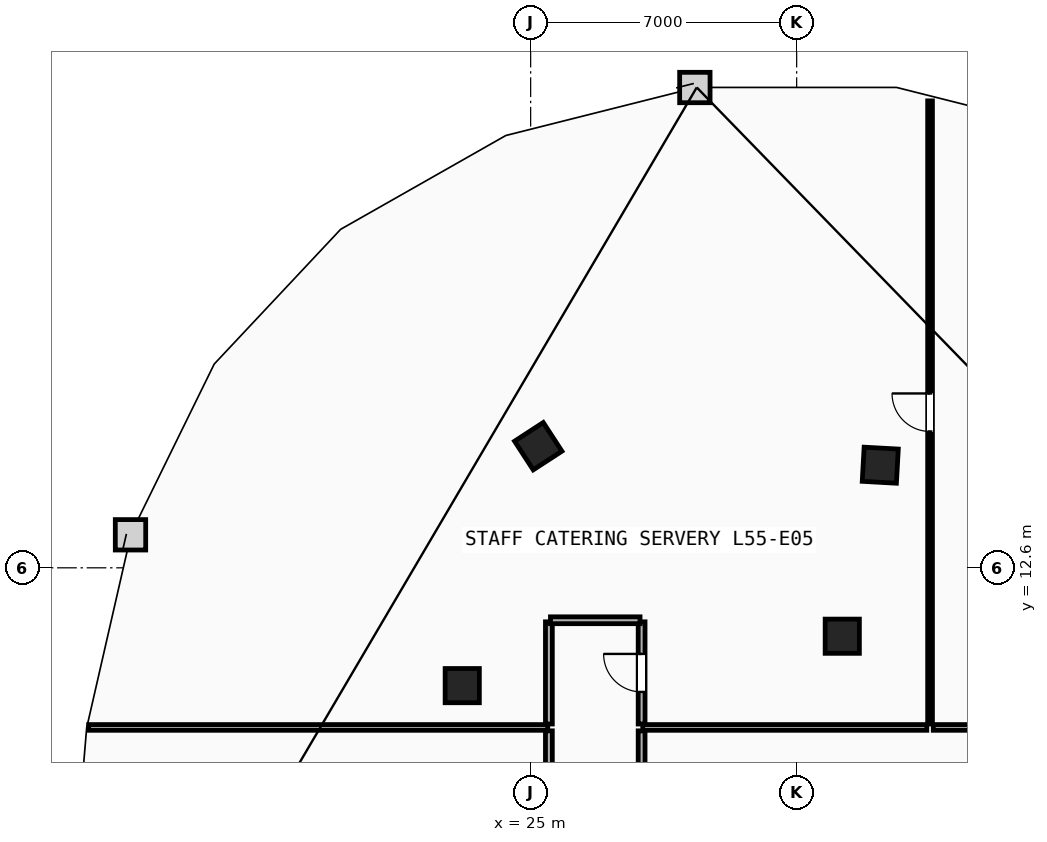
"""IFC4 building model, lengths in metres.
Left out: names, types, materials, properties, quantities, classifications, styles, units other than length and angle.
Written with IfcOpenShell. Run it as: python <this file> out.ifc"""

import sys

from ifc_helpers import new_model, si_unit, direction, frame, frame_2d, origin, origin_2d, place, context, subcontext, project, spatial, rectangle, extrude, element, fill, save


model = new_model("IFC4")
c1 = context("Model", 3, precision=1e-05, world=origin(), true_north=direction((0.0, 1.0)))
c2 = subcontext(c1, "Body", "Model", "MODEL_VIEW")
j1 = project(units=[si_unit("LENGTHUNIT", "METRE"), si_unit("PLANEANGLEUNIT", "RADIAN")], contexts=[c1])
p1 = place(None, origin())
s1 = spatial("IfcSite", under=j1, at=p1, CompositionType="ELEMENT")
p2 = place(p1, origin())
s2 = spatial("IfcBuilding", under=s1, at=p2, CompositionType="ELEMENT")
p3 = place(p2, frame((0.0, 0.0, 209.8)))
s3 = spatial("IfcBuildingStorey", under=s2, at=p3, CompositionType="ELEMENT", Elevation=209.8)
for number, where, z_axis, x_axis in (
    (1, (33.2, 10.8, 0.0), (0.0, 0.0, 1.0), (1.0, 0.0, 0.0)),
    (2, (23.2, 9.5, 0.0), (0.0, 0.0, 1.0), (1.0, 0.0, 0.0)),
    (3, (34.2, 15.3, 0.0), (0.0, 0.0, 1.0), (-0.998, 0.055, 0.0)),
    (4, (25.2, 15.8, 0.0), (0.0, 0.0, 1.0), (-0.838, -0.546, 0.0)),
):
    element("IfcColumn", number, at=place(p3, frame(where, z_axis=z_axis, x_axis=x_axis)), inside=s3, PredefinedType="COLUMN", context=c2, shape_type="SweptSolid", body=[
        extrude(rectangle(XDim=0.9, YDim=0.9, at=origin_2d()), origin(), (0.0, 0.0, 1.0), 3.6),
    ])
p4 = place(p3, frame((13.37, 8.4, 0.0), z_axis=(0.0, 0.0, 1.0), x_axis=(1.0, 0.0, 0.0)))
e5 = element("IfcWall", 5, at=p4, inside=s3, PredefinedType="PARTITIONING", context=c2, shape_type="SweptSolid", body=[
    extrude(rectangle(XDim=12.08, YDim=0.15, at=frame_2d((6.04, 0.0))), origin(), (0.0, 0.0, 1.0), 3.34),
])
p5 = place(p3, frame((27.95, 8.4, 0.0), z_axis=(0.0, 0.0, 1.0), x_axis=(1.0, 0.0, 0.0)))
e6 = element("IfcWall", 6, at=p5, inside=s3, PredefinedType="PARTITIONING", context=c2, shape_type="SweptSolid", body=[
    extrude(rectangle(XDim=7.475, YDim=0.15, at=frame_2d((3.738, 0.0))), origin(), (0.0, 0.0, 1.0), 3.34),
])
p6 = place(p3, frame((35.595, 8.4, 0.0), z_axis=(0.0, 0.0, 1.0), x_axis=(1.0, 0.0, 0.0)))
e7 = element("IfcWall", 7, at=p6, inside=s3, PredefinedType="PARTITIONING", context=c2, shape_type="SweptSolid", body=[
    extrude(rectangle(XDim=15.035, YDim=0.15, at=frame_2d((7.517, 0.0))), origin(), (0.0, 0.0, 1.0), 3.34),
])
p7 = place(p3, frame((25.48, 8.31, 0.0), z_axis=(0.0, 0.0, 1.0), x_axis=(0.0, -1.0, 0.0)))
e8 = element("IfcWall", 8, at=p7, inside=s3, PredefinedType="PARTITIONING", context=c2, shape_type="SweptSolid", body=[
    extrude(rectangle(XDim=7.86, YDim=0.18, at=frame_2d((3.93, 0.0))), origin(), (0.0, 0.0, 1.0), 3.34),
])
p8 = place(p3, frame((27.92, 0.45, 0.0), z_axis=(0.0, 0.0, 1.0), x_axis=(0.0, 1.0, 0.0)))
e9 = element("IfcWall", 9, at=p8, inside=s3, PredefinedType="PARTITIONING", context=c2, shape_type="SweptSolid", body=[
    extrude(rectangle(XDim=7.86, YDim=0.18, at=frame_2d((3.93, 0.0))), origin(), (0.0, 0.0, 1.0), 3.34),
])
p9 = place(p8, frame((3.43, 0.0, 0.0)))
e10 = element("IfcOpeningElement", 10, at=p9, cuts=e9, PredefinedType="OPENING", context=c2, shape_type="SweptSolid", body=[
    extrude(rectangle(XDim=1.0, YDim=2.15, at=frame_2d((0.5, 1.075))), frame((0.0, 0.1, 0.0), z_axis=(0.0, -1.0, 0.0), x_axis=(1.0, 0.0, 0.0)), (0.0, 0.0, 1.0), 0.2),
])
p10 = place(p3, frame((27.92, 8.49, 0.0), z_axis=(0.0, 0.0, 1.0), x_axis=(0.0, 1.0, 0.0)))
e11 = element("IfcWall", 11, at=p10, inside=s3, PredefinedType="PARTITIONING", context=c2, shape_type="SweptSolid", body=[
    extrude(rectangle(XDim=2.688, YDim=0.18, at=frame_2d((1.344, 0.0))), origin(), (0.0, 0.0, 1.0), 3.34),
])
p11 = place(p10, frame((0.844, 0.0, 0.0)))
e12 = element("IfcOpeningElement", 12, at=p11, cuts=e11, PredefinedType="OPENING", context=c2, shape_type="SweptSolid", body=[
    extrude(rectangle(XDim=1.0, YDim=2.15, at=frame_2d((0.5, 1.075))), frame((0.0, 0.1, 0.0), z_axis=(0.0, -1.0, 0.0), x_axis=(1.0, 0.0, 0.0)), (0.0, 0.0, 1.0), 0.2),
])
p12 = place(p3, frame((25.48, 11.178, 0.0), z_axis=(0.0, 0.0, 1.0), x_axis=(0.0, -1.0, 0.0)))
e13 = element("IfcWall", 13, at=p12, inside=s3, PredefinedType="PARTITIONING", context=c2, shape_type="SweptSolid", body=[
    extrude(rectangle(XDim=2.688, YDim=0.18, at=frame_2d((1.344, 0.0))), origin(), (0.0, 0.0, 1.0), 3.34),
])
p13 = place(p3, frame((27.878, 11.22, 0.0), z_axis=(0.0, 0.0, 1.0), x_axis=(-1.0, 0.0, 0.0)))
e14 = element("IfcWall", 14, at=p13, inside=s3, PredefinedType="PARTITIONING", context=c2, shape_type="SweptSolid", body=[
    extrude(rectangle(XDim=2.357, YDim=0.18, at=frame_2d((1.178, 0.0))), origin(), (0.0, 0.0, 1.0), 3.34),
])
p14 = place(p3, frame((35.51, 8.49, 0.0), z_axis=(0.0, 0.0, 1.0), x_axis=(0.0, 1.0, 0.0)))
e15 = element("IfcWall", 15, at=p14, inside=s3, PredefinedType="PARTITIONING", context=c2, shape_type="SweptSolid", body=[
    extrude(rectangle(XDim=16.396, YDim=0.125, at=frame_2d((8.198, 0.0))), origin(), (0.0, 0.0, 1.0), 3.34),
])
p15 = place(p14, frame((7.698, 0.0, 0.0)))
e16 = element("IfcOpeningElement", 16, at=p15, cuts=e15, PredefinedType="OPENING", context=c2, shape_type="SweptSolid", body=[
    extrude(rectangle(XDim=1.0, YDim=2.15, at=frame_2d((0.5, 1.075))), frame((0.0, 0.073, 0.0), z_axis=(0.0, -1.0, 0.0), x_axis=(1.0, 0.0, 0.0)), (0.0, 0.0, 1.0), 0.145),
])
p16 = place(p15, origin())
e17 = element("IfcDoor", 17, at=p16, inside=s3, OperationType="SINGLE_SWING_RIGHT", PredefinedType="DOOR", context=c2, shape_type="SweptSolid", body=[
    extrude(rectangle(XDim=1.0, YDim=2.15, at=frame_2d((0.5, 1.075))), frame((0.0, 0.025, 0.0), z_axis=(0.0, -1.0, 0.0), x_axis=(1.0, 0.0, 0.0)), (0.0, 0.0, 1.0), 0.05),
])
fill(e16, e17)
p17 = place(p11, origin())
e18 = element("IfcDoor", 18, at=p17, inside=s3, OperationType="SINGLE_SWING_RIGHT", PredefinedType="DOOR", context=c2, shape_type="SweptSolid", body=[
    extrude(rectangle(XDim=1.0, YDim=2.15, at=frame_2d((0.5, 1.075))), frame((0.0, 0.025, 0.0), z_axis=(0.0, -1.0, 0.0), x_axis=(1.0, 0.0, 0.0)), (0.0, 0.0, 1.0), 0.05),
])
fill(e12, e18)
save(model, sys.argv[1])
